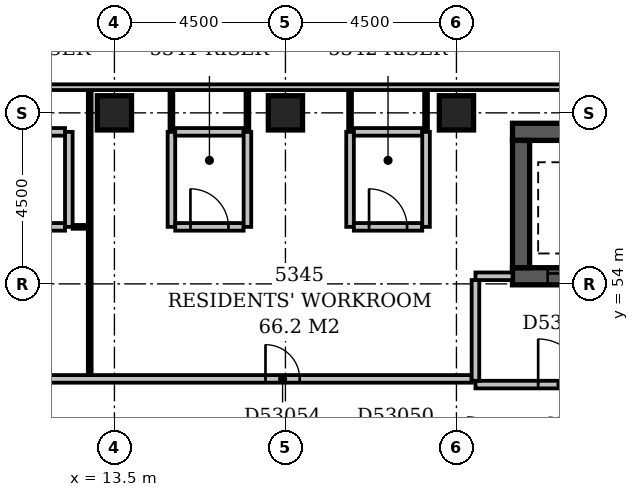
"""IFC4 building model, lengths in metres.
Left out: names, types, materials, properties, quantities, classifications, styles, units other than length and angle.
Written with IfcOpenShell. Run it as: python <this file> out.ifc"""

import sys

from ifc_helpers import new_model, si_unit, direction, frame, frame_2d, origin, origin_2d, place, context, subcontext, project, spatial, rectangle, extrude, element, fill, save


model = new_model("IFC4")
c1 = context("Model", 3, precision=1e-05, world=origin(), true_north=direction((0.0, 1.0)))
c2 = subcontext(c1, "Body", "Model", "MODEL_VIEW")
j1 = project(units=[si_unit("LENGTHUNIT", "METRE"), si_unit("PLANEANGLEUNIT", "RADIAN")], contexts=[c1])
p1 = place(None, origin())
s1 = spatial("IfcSite", under=j1, at=p1, CompositionType="ELEMENT")
p2 = place(p1, origin())
s2 = spatial("IfcBuilding", under=s1, at=p2, CompositionType="ELEMENT")
p3 = place(p2, frame((0.0, 0.0, 207.8)))
s3 = spatial("IfcBuildingStorey", under=s2, at=p3, CompositionType="ELEMENT", Elevation=207.8)
p4 = place(p3, frame((23.975, 54.2, -0.3), z_axis=(0.0, 0.0, 1.0), x_axis=(1.0, 0.0, 0.0)))
e1 = element("IfcWall", 1, at=p4, inside=s3, PredefinedType="SHEAR", context=c2, shape_type="SweptSolid", body=[
    extrude(rectangle(XDim=2.95, YDim=0.45, at=frame_2d((1.475, 0.0))), origin(), (0.0, 0.0, 1.0), 3.55),
])
p5 = place(p4, frame((0.925, 0.0, 0.3)))
e2 = element("IfcOpeningElement", 2, at=p5, cuts=e1, PredefinedType="OPENING", context=c2, shape_type="SweptSolid", body=[
    extrude(rectangle(XDim=1.1, YDim=2.1, at=frame_2d((0.55, 1.05))), frame((0.0, 0.237, 0.0), z_axis=(0.0, -1.0, 0.0), x_axis=(1.0, 0.0, 0.0)), (0.0, 0.0, 1.0), 0.474),
])
p6 = place(p3, frame((23.975, 58.0, -0.3), z_axis=(0.0, 0.0, 1.0), x_axis=(1.0, 0.0, 0.0)))
e3 = element("IfcWall", 3, at=p6, inside=s3, PredefinedType="SHEAR", context=c2, shape_type="SweptSolid", body=[
    extrude(rectangle(XDim=2.95, YDim=0.45, at=frame_2d((1.475, 0.0))), origin(), (0.0, 0.0, 1.0), 3.55),
])
p7 = place(p3, frame((24.2, 54.425, -0.3), z_axis=(0.0, 0.0, 1.0), x_axis=(0.0, 1.0, 0.0)))
e4 = element("IfcWall", 4, at=p7, inside=s3, PredefinedType="SHEAR", context=c2, shape_type="SweptSolid", body=[
    extrude(rectangle(XDim=3.35, YDim=0.45, at=frame_2d((1.675, 0.0))), origin(), (0.0, 0.0, 1.0), 3.55),
])
for number, where, z_axis, x_axis in (
    (5, (13.5, 58.5, -0.3), (0.0, 0.0, 1.0), (1.0, 0.0, 0.0)),
    (6, (18.0, 58.5, -0.3), (0.0, 0.0, 1.0), (1.0, 0.0, 0.0)),
    (7, (22.5, 58.5, -0.3), (0.0, 0.0, 1.0), (1.0, 0.0, 0.0)),
):
    element("IfcColumn", number, at=place(p3, frame(where, z_axis=z_axis, x_axis=x_axis)), inside=s3, PredefinedType="COLUMN", context=c2, shape_type="SweptSolid", body=[
        extrude(rectangle(XDim=0.9, YDim=0.9, at=origin_2d()), origin(), (0.0, 0.0, 1.0), 3.55),
    ])
p8 = place(p3, frame((50.1, 59.175, 0.0), z_axis=(0.0, 0.0, 1.0), x_axis=(-1.0, 0.0, 0.0)))
e8 = element("IfcWall", 8, at=p8, inside=s3, PredefinedType="STANDARD", context=c2, shape_type="SweptSolid", body=[
    extrude(rectangle(XDim=50.85, YDim=0.15, at=frame_2d((25.425, 0.0))), origin(), (0.0, 0.0, 1.0), 2.7),
])
p9 = place(p8, frame((19.65, 0.0, 0.6)))
e9 = element("IfcOpeningElement", 9, at=p9, cuts=e8, PredefinedType="OPENING", context=c2, shape_type="SweptSolid", body=[
    extrude(rectangle(XDim=2.4, YDim=1.8, at=frame_2d((1.2, 0.9))), frame((0.0, 0.087, 0.0), z_axis=(0.0, -1.0, 0.0), x_axis=(1.0, 0.0, 0.0)), (0.0, 0.0, 1.0), 0.174),
])
p10 = place(p3, frame((23.0, 51.35, 0.0), z_axis=(0.0, 0.0, 1.0), x_axis=(1.0, 0.0, 0.0)))
e10 = element("IfcWall", 10, at=p10, inside=s3, PredefinedType="PARTITIONING", context=c2, shape_type="SweptSolid", body=[
    extrude(rectangle(XDim=4.8, YDim=0.2, at=frame_2d((2.4, 0.0))), origin(), (0.0, 0.0, 1.0), 3.25),
])
p11 = place(p10, frame((1.65, 0.0, 0.0)))
e11 = element("IfcOpeningElement", 11, at=p11, cuts=e10, PredefinedType="OPENING", context=c2, shape_type="SweptSolid", body=[
    extrude(rectangle(XDim=1.2, YDim=2.1, at=frame_2d((0.6, 1.05))), frame((0.0, 0.112, 0.0), z_axis=(0.0, -1.0, 0.0), x_axis=(1.0, 0.0, 0.0)), (0.0, 0.0, 1.0), 0.224),
])
p12 = place(p3, frame((23.0, 54.2, 0.0), z_axis=(0.0, 0.0, 1.0), x_axis=(1.0, 0.0, 0.0)))
e12 = element("IfcWall", 12, at=p12, inside=s3, PredefinedType="PARTITIONING", context=c2, shape_type="SweptSolid", body=[
    extrude(rectangle(XDim=0.975, YDim=0.2, at=frame_2d((0.488, 0.0))), origin(), (0.0, 0.0, 1.0), 3.25),
])
p13 = place(p3, frame((23.0, 51.45, 0.0), z_axis=(0.0, 0.0, 1.0), x_axis=(0.0, 1.0, 0.0)))
e13 = element("IfcWall", 13, at=p13, inside=s3, PredefinedType="PARTITIONING", context=c2, shape_type="SweptSolid", body=[
    extrude(rectangle(XDim=2.65, YDim=0.2, at=frame_2d((1.325, 0.0))), origin(), (0.0, 0.0, 1.0), 3.25),
])
p14 = place(p3, frame((7.6, 51.5, 0.0), z_axis=(0.0, 0.0, 1.0), x_axis=(1.0, 0.0, 0.0)))
e14 = element("IfcWall", 14, at=p14, inside=s3, PredefinedType="PARTITIONING", context=c2, shape_type="SweptSolid", body=[
    extrude(rectangle(XDim=15.3, YDim=0.2, at=frame_2d((7.65, 0.0))), origin(), (0.0, 0.0, 1.0), 3.25),
])
p15 = place(p14, frame((2.075, 0.0, 0.0)))
e15 = element("IfcOpeningElement", 15, at=p15, cuts=e14, PredefinedType="OPENING", context=c2, shape_type="SweptSolid", body=[
    extrude(rectangle(XDim=1.0, YDim=2.1, at=frame_2d((0.5, 1.05))), frame((0.0, 0.112, 0.0), z_axis=(0.0, -1.0, 0.0), x_axis=(1.0, 0.0, 0.0)), (0.0, 0.0, 1.0), 0.224),
])
p16 = place(p14, frame((9.875, 0.0, 0.0)))
e16 = element("IfcOpeningElement", 16, at=p16, cuts=e14, PredefinedType="OPENING", context=c2, shape_type="SweptSolid", body=[
    extrude(rectangle(XDim=0.9, YDim=2.1, at=frame_2d((0.45, 1.05))), frame((0.0, 0.112, 0.0), z_axis=(0.0, -1.0, 0.0), x_axis=(1.0, 0.0, 0.0)), (0.0, 0.0, 1.0), 0.224),
])
p17 = place(p3, frame((12.85, 51.6, 0.0), z_axis=(0.0, 0.0, 1.0), x_axis=(0.0, 1.0, 0.0)))
e17 = element("IfcWall", 17, at=p17, inside=s3, PredefinedType="PARTITIONING", context=c2, shape_type="SweptSolid", body=[
    extrude(rectangle(XDim=7.5, YDim=0.1, at=frame_2d((3.75, 0.0))), origin(), (0.0, 0.0, 1.0), 3.25),
])
p18 = place(p3, frame((10.4, 55.5, 0.0), z_axis=(0.0, 0.0, 1.0), x_axis=(1.0, 0.0, 0.0)))
e18 = element("IfcWall", 18, at=p18, inside=s3, PredefinedType="PARTITIONING", context=c2, shape_type="SweptSolid", body=[
    extrude(rectangle(XDim=1.8, YDim=0.2, at=frame_2d((0.9, 0.0))), origin(), (0.0, 0.0, 1.0), 3.25),
])
p19 = place(p18, frame((0.4, 0.0, 0.0)))
e19 = element("IfcOpeningElement", 19, at=p19, cuts=e18, PredefinedType="OPENING", context=c2, shape_type="SweptSolid", body=[
    extrude(rectangle(XDim=1.0, YDim=2.1, at=frame_2d((0.5, 1.05))), frame((0.0, 0.112, 0.0), z_axis=(0.0, -1.0, 0.0), x_axis=(1.0, 0.0, 0.0)), (0.0, 0.0, 1.0), 0.224),
])
p20 = place(p3, frame((12.3, 55.5, 0.0), z_axis=(0.0, 0.0, 1.0), x_axis=(0.0, 1.0, 0.0)))
e20 = element("IfcWall", 20, at=p20, inside=s3, PredefinedType="PARTITIONING", context=c2, shape_type="SweptSolid", body=[
    extrude(rectangle(XDim=2.5, YDim=0.2, at=frame_2d((1.25, 0.0))), origin(), (0.0, 0.0, 1.0), 3.25),
])
p21 = place(p3, frame((12.4, 55.5, 0.0), z_axis=(0.0, 0.0, 1.0), x_axis=(1.0, 0.0, 0.0)))
e21 = element("IfcWall", 21, at=p21, inside=s3, PredefinedType="PARTITIONING", context=c2, shape_type="SweptSolid", body=[
    extrude(rectangle(XDim=0.4, YDim=0.1, at=frame_2d((0.2, 0.0))), origin(), (0.0, 0.0, 1.0), 3.25),
])
p22 = place(p3, frame((15.0, 55.5, 0.0), z_axis=(0.0, 0.0, 1.0), x_axis=(0.0, 1.0, 0.0)))
e22 = element("IfcWall", 22, at=p22, inside=s3, PredefinedType="PARTITIONING", context=c2, shape_type="SweptSolid", body=[
    extrude(rectangle(XDim=2.5, YDim=0.2, at=frame_2d((1.25, 0.0))), origin(), (0.0, 0.0, 1.0), 3.25),
])
p23 = place(p3, frame((15.1, 55.5, 0.0), z_axis=(0.0, 0.0, 1.0), x_axis=(1.0, 0.0, 0.0)))
e23 = element("IfcWall", 23, at=p23, inside=s3, PredefinedType="PARTITIONING", context=c2, shape_type="SweptSolid", body=[
    extrude(rectangle(XDim=1.8, YDim=0.2, at=frame_2d((0.9, 0.0))), origin(), (0.0, 0.0, 1.0), 3.25),
])
p24 = place(p23, frame((0.4, 0.0, 0.0)))
e24 = element("IfcOpeningElement", 24, at=p24, cuts=e23, PredefinedType="OPENING", context=c2, shape_type="SweptSolid", body=[
    extrude(rectangle(XDim=1.0, YDim=2.1, at=frame_2d((0.5, 1.05))), frame((0.0, 0.112, 0.0), z_axis=(0.0, -1.0, 0.0), x_axis=(1.0, 0.0, 0.0)), (0.0, 0.0, 1.0), 0.224),
])
for number, where, z_axis, x_axis in (
    (25, (17.0, 55.5, 0.0), (0.0, 0.0, 1.0), (0.0, 1.0, 0.0)),
    (26, (19.7, 55.5, 0.0), (0.0, 0.0, 1.0), (0.0, 1.0, 0.0)),
):
    element("IfcWall", number, at=place(p3, frame(where, z_axis=z_axis, x_axis=x_axis)), inside=s3, PredefinedType="PARTITIONING", context=c2, shape_type="SweptSolid", body=[
        extrude(rectangle(XDim=2.5, YDim=0.2, at=frame_2d((1.25, 0.0))), origin(), (0.0, 0.0, 1.0), 3.25),
    ])
p25 = place(p3, frame((19.8, 55.5, 0.0), z_axis=(0.0, 0.0, 1.0), x_axis=(1.0, 0.0, 0.0)))
e27 = element("IfcWall", 27, at=p25, inside=s3, PredefinedType="PARTITIONING", context=c2, shape_type="SweptSolid", body=[
    extrude(rectangle(XDim=1.8, YDim=0.2, at=frame_2d((0.9, 0.0))), origin(), (0.0, 0.0, 1.0), 3.25),
])
p26 = place(p25, frame((0.4, 0.0, 0.0)))
e28 = element("IfcOpeningElement", 28, at=p26, cuts=e27, PredefinedType="OPENING", context=c2, shape_type="SweptSolid", body=[
    extrude(rectangle(XDim=1.0, YDim=2.1, at=frame_2d((0.5, 1.05))), frame((0.0, 0.112, 0.0), z_axis=(0.0, -1.0, 0.0), x_axis=(1.0, 0.0, 0.0)), (0.0, 0.0, 1.0), 0.224),
])
p27 = place(p3, frame((21.7, 55.5, 0.0), z_axis=(0.0, 0.0, 1.0), x_axis=(0.0, 1.0, 0.0)))
e29 = element("IfcWall", 29, at=p27, inside=s3, PredefinedType="PARTITIONING", context=c2, shape_type="SweptSolid", body=[
    extrude(rectangle(XDim=2.5, YDim=0.2, at=frame_2d((1.25, 0.0))), origin(), (0.0, 0.0, 1.0), 3.25),
])
p28 = place(p3, frame((10.4, 58.0, 0.0), z_axis=(0.0, 0.0, 1.0), x_axis=(1.0, 0.0, 0.0)))
e30 = element("IfcWall", 30, at=p28, inside=s3, PredefinedType="PARTITIONING", context=c2, shape_type="SweptSolid", body=[
    extrude(rectangle(XDim=1.8, YDim=0.2, at=frame_2d((0.9, 0.0))), origin(), (0.0, 0.0, 1.0), 3.25),
])
p29 = place(p3, frame((15.0, 58.0, 0.0), z_axis=(0.0, 0.0, 1.0), x_axis=(0.0, 1.0, 0.0)))
e31 = element("IfcWall", 31, at=p29, inside=s3, PredefinedType="PARTITIONING", context=c2, shape_type="SweptSolid", body=[
    extrude(rectangle(XDim=1.1, YDim=0.1, at=frame_2d((0.55, 0.0))), origin(), (0.0, 0.0, 1.0), 3.25),
])
p30 = place(p3, frame((15.1, 58.0, 0.0), z_axis=(0.0, 0.0, 1.0), x_axis=(1.0, 0.0, 0.0)))
e32 = element("IfcWall", 32, at=p30, inside=s3, PredefinedType="PARTITIONING", context=c2, shape_type="SweptSolid", body=[
    extrude(rectangle(XDim=1.8, YDim=0.2, at=frame_2d((0.9, 0.0))), origin(), (0.0, 0.0, 1.0), 3.25),
])
for number, where, z_axis, x_axis in (
    (33, (17.0, 58.0, 0.0), (0.0, 0.0, 1.0), (0.0, 1.0, 0.0)),
    (34, (19.7, 58.0, 0.0), (0.0, 0.0, 1.0), (0.0, 1.0, 0.0)),
):
    element("IfcWall", number, at=place(p3, frame(where, z_axis=z_axis, x_axis=x_axis)), inside=s3, PredefinedType="PARTITIONING", context=c2, shape_type="SweptSolid", body=[
        extrude(rectangle(XDim=1.1, YDim=0.1, at=frame_2d((0.55, 0.0))), origin(), (0.0, 0.0, 1.0), 3.25),
    ])
p31 = place(p3, frame((19.8, 58.0, 0.0), z_axis=(0.0, 0.0, 1.0), x_axis=(1.0, 0.0, 0.0)))
e35 = element("IfcWall", 35, at=p31, inside=s3, PredefinedType="PARTITIONING", context=c2, shape_type="SweptSolid", body=[
    extrude(rectangle(XDim=1.8, YDim=0.2, at=frame_2d((0.9, 0.0))), origin(), (0.0, 0.0, 1.0), 3.25),
])
p32 = place(p3, frame((21.7, 58.0, 0.0), z_axis=(0.0, 0.0, 1.0), x_axis=(0.0, 1.0, 0.0)))
e36 = element("IfcWall", 36, at=p32, inside=s3, PredefinedType="PARTITIONING", context=c2, shape_type="SweptSolid", body=[
    extrude(rectangle(XDim=1.1, YDim=0.1, at=frame_2d((0.55, 0.0))), origin(), (0.0, 0.0, 1.0), 3.25),
])
p33 = place(p11, origin())
e37 = element("IfcDoor", 37, at=p33, inside=s3, OperationType="SINGLE_SWING_LEFT", PredefinedType="DOOR", context=c2, shape_type="SweptSolid", body=[
    extrude(rectangle(XDim=1.2, YDim=2.1, at=frame_2d((0.6, 1.05))), frame((0.0, 0.025, 0.0), z_axis=(0.0, -1.0, 0.0), x_axis=(1.0, 0.0, 0.0)), (0.0, 0.0, 1.0), 0.05),
])
fill(e11, e37)
p34 = place(p5, origin())
e38 = element("IfcDoor", 38, at=p34, inside=s3, OperationType="SLIDING_TO_LEFT", PredefinedType="DOOR", context=c2, shape_type="SweptSolid", body=[
    extrude(rectangle(XDim=1.1, YDim=2.1, at=frame_2d((0.55, 1.05))), frame((0.0, 0.025, 0.0), z_axis=(0.0, -1.0, 0.0), x_axis=(1.0, 0.0, 0.0)), (0.0, 0.0, 1.0), 0.05),
])
fill(e2, e38)
p35 = place(p16, origin())
e39 = element("IfcDoor", 39, at=p35, inside=s3, OperationType="SINGLE_SWING_LEFT", PredefinedType="DOOR", context=c2, shape_type="SweptSolid", body=[
    extrude(rectangle(XDim=0.9, YDim=2.1, at=frame_2d((0.45, 1.05))), frame((0.0, 0.025, 0.0), z_axis=(0.0, -1.0, 0.0), x_axis=(1.0, 0.0, 0.0)), (0.0, 0.0, 1.0), 0.05),
])
fill(e16, e39)
p36 = place(p24, origin())
e40 = element("IfcDoor", 40, at=p36, inside=s3, OperationType="SINGLE_SWING_LEFT", PredefinedType="DOOR", context=c2, shape_type="SweptSolid", body=[
    extrude(rectangle(XDim=1.0, YDim=2.1, at=frame_2d((0.5, 1.05))), frame((0.0, 0.025, 0.0), z_axis=(0.0, -1.0, 0.0), x_axis=(1.0, 0.0, 0.0)), (0.0, 0.0, 1.0), 0.05),
])
fill(e24, e40)
p37 = place(p26, origin())
e41 = element("IfcDoor", 41, at=p37, inside=s3, OperationType="SINGLE_SWING_LEFT", PredefinedType="DOOR", context=c2, shape_type="SweptSolid", body=[
    extrude(rectangle(XDim=1.0, YDim=2.1, at=frame_2d((0.5, 1.05))), frame((0.0, 0.025, 0.0), z_axis=(0.0, -1.0, 0.0), x_axis=(1.0, 0.0, 0.0)), (0.0, 0.0, 1.0), 0.05),
])
fill(e28, e41)
save(model, sys.argv[1])
